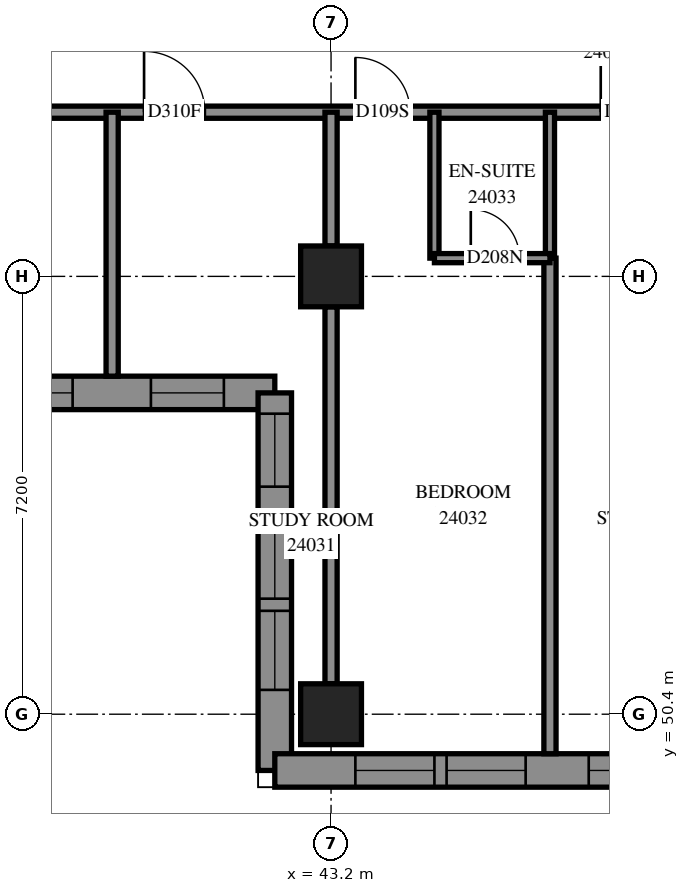
"""IFC4 building model, lengths in metres.
Left out: names, types, materials, properties, quantities, classifications, styles, units other than length and angle.
Written with IfcOpenShell. Run it as: python <this file> out.ifc"""

import sys

from ifc_helpers import new_model, si_unit, direction, frame, frame_2d, origin, origin_2d, place, context, subcontext, project, spatial, polyline, rectangle, outline, extrude, element, fill, save


model = new_model("IFC4")
c1 = context("Model", 3, precision=1e-05, world=origin(), true_north=direction((0.0, 1.0)))
c2 = subcontext(c1, "Body", "Model", "MODEL_VIEW")
j1 = project(units=[si_unit("LENGTHUNIT", "METRE"), si_unit("PLANEANGLEUNIT", "RADIAN")], contexts=[c1])
p1 = place(None, origin())
s1 = spatial("IfcSite", under=j1, at=p1, CompositionType="ELEMENT")
p2 = place(p1, origin())
s2 = spatial("IfcBuilding", under=s1, at=p2, CompositionType="ELEMENT")
p3 = place(p2, frame((0.0, 0.0, 91.4)))
s3 = spatial("IfcBuildingStorey", under=s2, at=p3, CompositionType="ELEMENT", Elevation=91.4)
for number, where, z_axis, x_axis in (
    (1, (43.2, 50.4, 0.0), (0.0, 0.0, 1.0), (1.0, 0.0, 0.0)),
    (2, (43.2, 57.6, 0.0), (0.0, 0.0, 1.0), (1.0, 0.0, 0.0)),
):
    element("IfcColumn", number, at=place(p3, frame(where, z_axis=z_axis, x_axis=x_axis)), inside=s3, PredefinedType="COLUMN", context=c2, shape_type="SweptSolid", body=[
        extrude(rectangle(XDim=1.0, YDim=1.0, at=origin_2d()), origin(), (0.0, 0.0, 1.0), 3.1),
    ])
p4 = place(p3, frame((27.875, 55.684, 0.0), z_axis=(0.0, 0.0, 1.0), x_axis=(1.0, 0.0, 0.0)))
e3 = element("IfcWall", 3, at=p4, inside=s3, PredefinedType="SOLIDWALL", context=c2, shape_type="SweptSolid", body=[
    extrude(outline(polyline([(-0.275, -0.275), (14.125, -0.275), (14.675, 0.275), (0.275, 0.275), (-0.275, -0.275)])), origin(), (0.0, 0.0, 1.0), 3.1),
])
p5 = place(p4, frame((1.175, 0.0, 0.5)))
e4 = element("IfcOpeningElement", 4, at=p5, cuts=e3, PredefinedType="OPENING", context=c2, shape_type="SweptSolid", body=[
    extrude(rectangle(XDim=1.3, YDim=2.45, at=frame_2d((0.65, 1.225))), frame((0.0, 0.285, 0.0), z_axis=(0.0, -1.0, 0.0), x_axis=(1.0, 0.0, 0.0)), (0.0, 0.0, 1.0), 0.57),
])
p6 = place(p4, frame((2.675, 0.0, 0.5)))
e5 = element("IfcOpeningElement", 5, at=p6, cuts=e3, PredefinedType="OPENING", context=c2, shape_type="SweptSolid", body=[
    extrude(rectangle(XDim=1.3, YDim=2.45, at=frame_2d((0.65, 1.225))), frame((0.0, 0.285, 0.0), z_axis=(0.0, -1.0, 0.0), x_axis=(1.0, 0.0, 0.0)), (0.0, 0.0, 1.0), 0.57),
])
p7 = place(p4, frame((4.925, 0.0, 0.5)))
e6 = element("IfcOpeningElement", 6, at=p7, cuts=e3, PredefinedType="OPENING", context=c2, shape_type="SweptSolid", body=[
    extrude(rectangle(XDim=1.3, YDim=2.45, at=frame_2d((0.65, 1.225))), frame((0.0, 0.285, 0.0), z_axis=(0.0, -1.0, 0.0), x_axis=(1.0, 0.0, 0.0)), (0.0, 0.0, 1.0), 0.57),
])
p8 = place(p4, frame((6.425, 0.0, 0.5)))
e7 = element("IfcOpeningElement", 7, at=p8, cuts=e3, PredefinedType="OPENING", context=c2, shape_type="SweptSolid", body=[
    extrude(rectangle(XDim=1.3, YDim=2.45, at=frame_2d((0.65, 1.225))), frame((0.0, 0.285, 0.0), z_axis=(0.0, -1.0, 0.0), x_axis=(1.0, 0.0, 0.0)), (0.0, 0.0, 1.0), 0.57),
])
p9 = place(p4, frame((8.275, 0.0, 0.5)))
e8 = element("IfcOpeningElement", 8, at=p9, cuts=e3, PredefinedType="OPENING", context=c2, shape_type="SweptSolid", body=[
    extrude(rectangle(XDim=1.3, YDim=2.45, at=frame_2d((0.65, 1.225))), frame((0.0, 0.285, 0.0), z_axis=(0.0, -1.0, 0.0), x_axis=(1.0, 0.0, 0.0)), (0.0, 0.0, 1.0), 0.57),
])
p10 = place(p4, frame((9.775, 0.0, 0.5)))
e9 = element("IfcOpeningElement", 9, at=p10, cuts=e3, PredefinedType="OPENING", context=c2, shape_type="SweptSolid", body=[
    extrude(rectangle(XDim=1.3, YDim=2.45, at=frame_2d((0.65, 1.225))), frame((0.0, 0.285, 0.0), z_axis=(0.0, -1.0, 0.0), x_axis=(1.0, 0.0, 0.0)), (0.0, 0.0, 1.0), 0.57),
])
p11 = place(p4, frame((12.363, 0.0, 0.5)))
e10 = element("IfcOpeningElement", 10, at=p11, cuts=e3, PredefinedType="OPENING", context=c2, shape_type="SweptSolid", body=[
    extrude(rectangle(XDim=1.2, YDim=2.45, at=frame_2d((0.6, 1.225))), frame((0.0, 0.285, 0.0), z_axis=(0.0, -1.0, 0.0), x_axis=(1.0, 0.0, 0.0)), (0.0, 0.0, 1.0), 0.57),
])
p12 = place(p3, frame((42.275, 55.684, 0.0), z_axis=(0.0, 0.0, 1.0), x_axis=(0.0, -1.0, 0.0)))
e11 = element("IfcWall", 11, at=p12, inside=s3, PredefinedType="SOLIDWALL", context=c2, shape_type="SweptSolid", body=[
    extrude(outline(polyline([(0.275, -0.275), (6.484, -0.275), (5.934, 0.275), (-0.275, 0.275), (0.275, -0.275)])), origin(), (0.0, 0.0, 1.0), 3.1),
])
p13 = place(p12, frame((2.084, 0.0, 0.5)))
e12 = element("IfcOpeningElement", 12, at=p13, cuts=e11, PredefinedType="OPENING", context=c2, shape_type="SweptSolid", body=[
    extrude(rectangle(XDim=1.3, YDim=2.45, at=frame_2d((0.65, 1.225))), frame((0.0, 0.285, 0.0), z_axis=(0.0, -1.0, 0.0), x_axis=(1.0, 0.0, 0.0)), (0.0, 0.0, 1.0), 0.57),
])
p14 = place(p12, frame((3.584, 0.0, 0.5)))
e13 = element("IfcOpeningElement", 13, at=p14, cuts=e11, PredefinedType="OPENING", context=c2, shape_type="SweptSolid", body=[
    extrude(rectangle(XDim=1.3, YDim=2.45, at=frame_2d((0.65, 1.225))), frame((0.0, 0.285, 0.0), z_axis=(0.0, -1.0, 0.0), x_axis=(1.0, 0.0, 0.0)), (0.0, 0.0, 1.0), 0.57),
])
p15 = place(p12, frame((0.342, 0.0, 0.5)))
e14 = element("IfcOpeningElement", 14, at=p15, cuts=e11, PredefinedType="OPENING", context=c2, shape_type="SweptSolid", body=[
    extrude(rectangle(XDim=1.2, YDim=2.45, at=frame_2d((0.6, 1.225))), frame((0.0, 0.285, 0.0), z_axis=(0.0, -1.0, 0.0), x_axis=(1.0, 0.0, 0.0)), (0.0, 0.0, 1.0), 0.57),
])
p16 = place(p3, frame((42.275, 49.475, 0.0), z_axis=(0.0, 0.0, 1.0), x_axis=(1.0, 0.0, 0.0)))
e15 = element("IfcWall", 15, at=p16, inside=s3, PredefinedType="SOLIDWALL", context=c2, shape_type="SweptSolid", body=[
    extrude(outline(polyline([(-0.275, -0.275), (6.925, -0.275), (7.475, 0.275), (0.275, 0.275), (-0.275, -0.275)])), origin(), (0.0, 0.0, 1.0), 3.1),
])
p17 = place(p16, frame((1.325, 0.0, 0.5)))
e16 = element("IfcOpeningElement", 16, at=p17, cuts=e15, PredefinedType="OPENING", context=c2, shape_type="SweptSolid", body=[
    extrude(rectangle(XDim=1.3, YDim=2.45, at=frame_2d((0.65, 1.225))), frame((0.0, 0.285, 0.0), z_axis=(0.0, -1.0, 0.0), x_axis=(1.0, 0.0, 0.0)), (0.0, 0.0, 1.0), 0.57),
])
p18 = place(p16, frame((2.825, 0.0, 0.5)))
e17 = element("IfcOpeningElement", 17, at=p18, cuts=e15, PredefinedType="OPENING", context=c2, shape_type="SweptSolid", body=[
    extrude(rectangle(XDim=1.3, YDim=2.45, at=frame_2d((0.65, 1.225))), frame((0.0, 0.285, 0.0), z_axis=(0.0, -1.0, 0.0), x_axis=(1.0, 0.0, 0.0)), (0.0, 0.0, 1.0), 0.57),
])
p19 = place(p16, frame((5.162, 0.0, 0.5)))
e18 = element("IfcOpeningElement", 18, at=p19, cuts=e15, PredefinedType="OPENING", context=c2, shape_type="SweptSolid", body=[
    extrude(rectangle(XDim=1.2, YDim=2.45, at=frame_2d((0.6, 1.225))), frame((0.0, 0.285, 0.0), z_axis=(0.0, -1.0, 0.0), x_axis=(1.0, 0.0, 0.0)), (0.0, 0.0, 1.0), 0.57),
])
p20 = place(p3, frame((28.802, 60.3, 0.0), z_axis=(0.0, 0.0, 1.0), x_axis=(1.0, 0.0, 0.0)))
e19 = element("IfcWall", 19, at=p20, inside=s3, PredefinedType="PARTITIONING", context=c2, shape_type="SweptSolid", body=[
    extrude(rectangle(XDim=24.298, YDim=0.2, at=frame_2d((12.149, 0.0))), origin(), (0.0, 0.0, 1.0), 3.1),
])
p21 = place(p20, frame((5.972, 0.0, 0.0)))
e20 = element("IfcOpeningElement", 20, at=p21, cuts=e19, PredefinedType="OPENING", context=c2, shape_type="SweptSolid", body=[
    extrude(rectangle(XDim=1.0, YDim=2.1, at=frame_2d((0.5, 1.05))), frame((0.0, 0.11, 0.0), z_axis=(0.0, -1.0, 0.0), x_axis=(1.0, 0.0, 0.0)), (0.0, 0.0, 1.0), 0.22),
])
p22 = place(p20, frame((11.323, 0.0, 0.0)))
e21 = element("IfcOpeningElement", 21, at=p22, cuts=e19, PredefinedType="OPENING", context=c2, shape_type="SweptSolid", body=[
    extrude(rectangle(XDim=1.0, YDim=2.1, at=frame_2d((0.5, 1.05))), frame((0.0, 0.11, 0.0), z_axis=(0.0, -1.0, 0.0), x_axis=(1.0, 0.0, 0.0)), (0.0, 0.0, 1.0), 0.22),
])
p23 = place(p20, frame((14.798, 0.0, 0.0)))
e22 = element("IfcOpeningElement", 22, at=p23, cuts=e19, PredefinedType="OPENING", context=c2, shape_type="SweptSolid", body=[
    extrude(rectangle(XDim=0.9, YDim=2.1, at=frame_2d((0.45, 1.05))), frame((0.0, 0.11, 0.0), z_axis=(0.0, -1.0, 0.0), x_axis=(1.0, 0.0, 0.0)), (0.0, 0.0, 1.0), 0.22),
])
p24 = place(p20, frame((18.833, 0.0, 0.0)))
e23 = element("IfcOpeningElement", 23, at=p24, cuts=e19, PredefinedType="OPENING", context=c2, shape_type="SweptSolid", body=[
    extrude(rectangle(XDim=1.0, YDim=2.1, at=frame_2d((0.5, 1.05))), frame((0.0, 0.11, 0.0), z_axis=(0.0, -1.0, 0.0), x_axis=(1.0, 0.0, 0.0)), (0.0, 0.0, 1.0), 0.22),
])
p25 = place(p20, frame((23.151, 0.0, 0.0)))
e24 = element("IfcOpeningElement", 24, at=p25, cuts=e19, PredefinedType="OPENING", context=c2, shape_type="SweptSolid", body=[
    extrude(rectangle(XDim=1.0, YDim=2.1, at=frame_2d((0.5, 1.05))), frame((0.0, 0.11, 0.0), z_axis=(0.0, -1.0, 0.0), x_axis=(1.0, 0.0, 0.0)), (0.0, 0.0, 1.0), 0.22),
])
p26 = place(p3, frame((46.8, 49.75, 0.0), z_axis=(0.0, 0.0, 1.0), x_axis=(0.0, 1.0, 0.0)))
e25 = element("IfcWall", 25, at=p26, inside=s3, PredefinedType="PARTITIONING", context=c2, shape_type="SweptSolid", body=[
    extrude(rectangle(XDim=8.15, YDim=0.2, at=frame_2d((4.075, 0.0))), origin(), (0.0, 0.0, 1.0), 3.1),
])
p27 = place(p3, frame((43.2, 50.9, 0.0), z_axis=(0.0, 0.0, 1.0), x_axis=(0.0, 1.0, 0.0)))
e26 = element("IfcWall", 26, at=p27, inside=s3, PredefinedType="PARTITIONING", context=c2, shape_type="SweptSolid", body=[
    extrude(rectangle(XDim=6.2, YDim=0.2, at=frame_2d((3.1, 0.0))), origin(), (0.0, 0.0, 1.0), 2.6),
])
p28 = place(p3, frame((39.6, 55.959, 0.0), z_axis=(0.0, 0.0, 1.0), x_axis=(0.0, 1.0, 0.0)))
e27 = element("IfcWall", 27, at=p28, inside=s3, PredefinedType="PARTITIONING", context=c2, shape_type="SweptSolid", body=[
    extrude(rectangle(XDim=4.341, YDim=0.2, at=frame_2d((2.171, 0.0))), origin(), (0.0, 0.0, 1.0), 3.1),
])
for number, where, z_axis, x_axis in (
    (28, (44.9, 57.9, 0.0), (0.0, 0.0, 1.0), (0.0, 1.0, 0.0)),
    (29, (46.8, 57.9, 0.0), (0.0, 0.0, 1.0), (0.0, 1.0, 0.0)),
):
    element("IfcWall", number, at=place(p3, frame(where, z_axis=z_axis, x_axis=x_axis)), inside=s3, PredefinedType="PARTITIONING", context=c2, shape_type="SweptSolid", body=[
        extrude(rectangle(XDim=2.4, YDim=0.15, at=frame_2d((1.2, 0.0))), origin(), (0.0, 0.0, 1.0), 3.1),
    ])
p29 = place(p3, frame((43.2, 58.1, 0.0), z_axis=(0.0, 0.0, 1.0), x_axis=(0.0, 1.0, 0.0)))
e30 = element("IfcWall", 30, at=p29, inside=s3, PredefinedType="PARTITIONING", context=c2, shape_type="SweptSolid", body=[
    extrude(rectangle(XDim=2.2, YDim=0.2, at=frame_2d((1.1, 0.0))), origin(), (0.0, 0.0, 1.0), 3.1),
])
p30 = place(p3, frame((44.9, 57.9, 0.0), z_axis=(0.0, 0.0, 1.0), x_axis=(1.0, 0.0, 0.0)))
e31 = element("IfcWall", 31, at=p30, inside=s3, PredefinedType="PARTITIONING", context=c2, shape_type="SweptSolid", body=[
    extrude(rectangle(XDim=1.9, YDim=0.15, at=frame_2d((0.95, 0.0))), origin(), (0.0, 0.0, 1.0), 3.1),
])
p31 = place(p30, frame((0.598, 0.0, 0.0)))
e32 = element("IfcOpeningElement", 32, at=p31, cuts=e31, PredefinedType="OPENING", context=c2, shape_type="SweptSolid", body=[
    extrude(rectangle(XDim=0.8, YDim=2.1, at=frame_2d((0.4, 1.05))), frame((0.0, 0.085, 0.0), z_axis=(0.0, -1.0, 0.0), x_axis=(1.0, 0.0, 0.0)), (0.0, 0.0, 1.0), 0.17),
])
p32 = place(p10, origin())
e33 = element("IfcWindow", 33, at=p32, inside=s3, PartitioningType="SINGLE_PANEL", PredefinedType="WINDOW", context=c2, shape_type="SweptSolid", body=[
    extrude(rectangle(XDim=1.3, YDim=2.45, at=frame_2d((0.65, 1.225))), frame((0.0, 0.155, 0.0), z_axis=(0.0, -1.0, 0.0), x_axis=(1.0, 0.0, 0.0)), (0.0, 0.0, 1.0), 0.06),
])
fill(e9, e33)
p33 = place(p11, origin())
e34 = element("IfcWindow", 34, at=p33, inside=s3, PartitioningType="SINGLE_PANEL", PredefinedType="WINDOW", context=c2, shape_type="SweptSolid", body=[
    extrude(rectangle(XDim=1.2, YDim=2.45, at=frame_2d((0.6, 1.225))), frame((0.0, 0.155, 0.0), z_axis=(0.0, -1.0, 0.0), x_axis=(1.0, 0.0, 0.0)), (0.0, 0.0, 1.0), 0.06),
])
fill(e10, e34)
p34 = place(p13, origin())
e35 = element("IfcWindow", 35, at=p34, inside=s3, PartitioningType="SINGLE_PANEL", PredefinedType="WINDOW", context=c2, shape_type="SweptSolid", body=[
    extrude(rectangle(XDim=1.3, YDim=2.45, at=frame_2d((0.65, 1.225))), frame((0.0, 0.155, 0.0), z_axis=(0.0, -1.0, 0.0), x_axis=(1.0, 0.0, 0.0)), (0.0, 0.0, 1.0), 0.06),
])
fill(e12, e35)
p35 = place(p14, origin())
e36 = element("IfcWindow", 36, at=p35, inside=s3, PartitioningType="SINGLE_PANEL", PredefinedType="WINDOW", context=c2, shape_type="SweptSolid", body=[
    extrude(rectangle(XDim=1.3, YDim=2.45, at=frame_2d((0.65, 1.225))), frame((0.0, 0.155, 0.0), z_axis=(0.0, -1.0, 0.0), x_axis=(1.0, 0.0, 0.0)), (0.0, 0.0, 1.0), 0.06),
])
fill(e13, e36)
p36 = place(p15, origin())
e37 = element("IfcWindow", 37, at=p36, inside=s3, PartitioningType="SINGLE_PANEL", PredefinedType="WINDOW", context=c2, shape_type="SweptSolid", body=[
    extrude(rectangle(XDim=1.2, YDim=2.45, at=frame_2d((0.6, 1.225))), frame((0.0, 0.155, 0.0), z_axis=(0.0, -1.0, 0.0), x_axis=(1.0, 0.0, 0.0)), (0.0, 0.0, 1.0), 0.06),
])
fill(e14, e37)
p37 = place(p17, origin())
e38 = element("IfcWindow", 38, at=p37, inside=s3, PartitioningType="SINGLE_PANEL", PredefinedType="WINDOW", context=c2, shape_type="SweptSolid", body=[
    extrude(rectangle(XDim=1.3, YDim=2.45, at=frame_2d((0.65, 1.225))), frame((0.0, 0.155, 0.0), z_axis=(0.0, -1.0, 0.0), x_axis=(1.0, 0.0, 0.0)), (0.0, 0.0, 1.0), 0.06),
])
fill(e16, e38)
p38 = place(p18, origin())
e39 = element("IfcWindow", 39, at=p38, inside=s3, PartitioningType="SINGLE_PANEL", PredefinedType="WINDOW", context=c2, shape_type="SweptSolid", body=[
    extrude(rectangle(XDim=1.3, YDim=2.45, at=frame_2d((0.65, 1.225))), frame((0.0, 0.155, 0.0), z_axis=(0.0, -1.0, 0.0), x_axis=(1.0, 0.0, 0.0)), (0.0, 0.0, 1.0), 0.06),
])
fill(e17, e39)
p39 = place(p19, origin())
e40 = element("IfcWindow", 40, at=p39, inside=s3, PartitioningType="SINGLE_PANEL", PredefinedType="WINDOW", context=c2, shape_type="SweptSolid", body=[
    extrude(rectangle(XDim=1.2, YDim=2.45, at=frame_2d((0.6, 1.225))), frame((0.0, 0.155, 0.0), z_axis=(0.0, -1.0, 0.0), x_axis=(1.0, 0.0, 0.0)), (0.0, 0.0, 1.0), 0.06),
])
fill(e18, e40)
p40 = place(p22, origin())
e41 = element("IfcDoor", 41, at=p40, inside=s3, OperationType="SINGLE_SWING_RIGHT", PredefinedType="DOOR", context=c2, shape_type="SweptSolid", body=[
    extrude(rectangle(XDim=1.0, YDim=2.1, at=frame_2d((0.5, 1.05))), frame((0.0, 0.025, 0.0), z_axis=(0.0, -1.0, 0.0), x_axis=(1.0, 0.0, 0.0)), (0.0, 0.0, 1.0), 0.05),
])
fill(e21, e41)
p41 = place(p23, origin())
e42 = element("IfcDoor", 42, at=p41, inside=s3, OperationType="SINGLE_SWING_LEFT", PredefinedType="DOOR", context=c2, shape_type="SweptSolid", body=[
    extrude(rectangle(XDim=0.9, YDim=2.1, at=frame_2d((0.45, 1.05))), frame((0.0, 0.025, 0.0), z_axis=(0.0, -1.0, 0.0), x_axis=(1.0, 0.0, 0.0)), (0.0, 0.0, 1.0), 0.05),
])
fill(e22, e42)
p42 = place(p31, origin())
e43 = element("IfcDoor", 43, at=p42, inside=s3, OperationType="SINGLE_SWING_RIGHT", PredefinedType="DOOR", context=c2, shape_type="SweptSolid", body=[
    extrude(rectangle(XDim=0.8, YDim=2.1, at=frame_2d((0.4, 1.05))), frame((0.0, 0.025, 0.0), z_axis=(0.0, -1.0, 0.0), x_axis=(1.0, 0.0, 0.0)), (0.0, 0.0, 1.0), 0.05),
])
fill(e32, e43)
p43 = place(p24, origin())
e44 = element("IfcDoor", 44, at=p43, inside=s3, OperationType="SINGLE_SWING_RIGHT", PredefinedType="DOOR", context=c2, shape_type="SweptSolid", body=[
    extrude(rectangle(XDim=1.0, YDim=2.1, at=frame_2d((0.5, 1.05))), frame((0.0, 0.025, 0.0), z_axis=(0.0, -1.0, 0.0), x_axis=(1.0, 0.0, 0.0)), (0.0, 0.0, 1.0), 0.05),
])
fill(e23, e44)
save(model, sys.argv[1])
